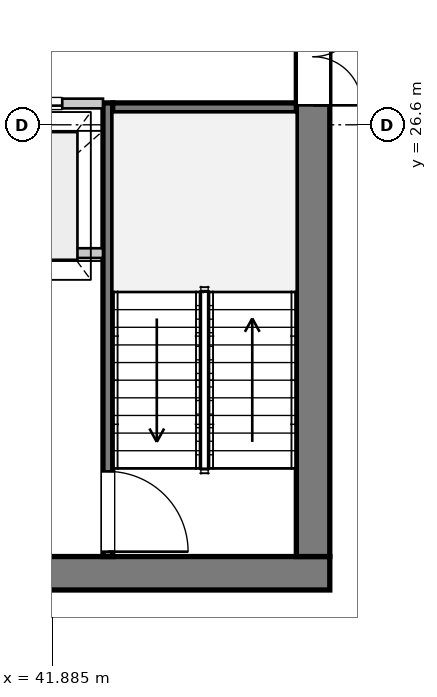
"""IFC4 building model, lengths in metres.
Left out: names, types, materials, properties, quantities, classifications, styles, units other than length and angle.
Written with IfcOpenShell. Run it as: python <this file> out.ifc"""

import sys

from ifc_helpers import new_model, si_unit, direction, frame, frame_2d, origin, place, context, subcontext, project, spatial, rectangle, extrude, source, transform, mapped, element, fill, save


model = new_model("IFC4")
c1 = context("Model", 3, precision=1e-05, world=origin(), true_north=direction((0.0, 1.0)))
c2 = subcontext(c1, "Body", "Model", "MODEL_VIEW")
j1 = project(units=[si_unit("LENGTHUNIT", "METRE"), si_unit("PLANEANGLEUNIT", "RADIAN")], contexts=[c1])
p1 = place(None, origin())
s1 = spatial("IfcSite", under=j1, at=p1, CompositionType="ELEMENT")
p2 = place(p1, origin())
s2 = spatial("IfcBuilding", under=s1, at=p2, CompositionType="ELEMENT")
p3 = place(p2, frame((0.0, 0.0, 185.65)))
s3 = spatial("IfcBuildingStorey", under=s2, at=p3, CompositionType="ELEMENT", Elevation=185.65)
p4 = place(p3, frame((53.034, 21.565, 0.0), z_axis=(0.0, 0.0, 1.0), x_axis=(-0.58764790483, -0.809116765337, 0.0)))
e1 = element("IfcWall", 1, at=p4, inside=s3, PredefinedType="SOLIDWALL", context=c2, shape_type="SweptSolid", body=[
    extrude(rectangle(XDim=23.285, YDim=0.32, at=frame_2d((11.643, 0.0))), origin(), (0.0, 0.0, 1.0), 2.722),
])
p5 = place(p4, frame((7.451, 0.0, 0.0)))
e2 = element("IfcOpeningElement", 2, at=p5, cuts=e1, PredefinedType="OPENING", context=c2, shape_type="SweptSolid", body=[
    extrude(rectangle(XDim=1.5, YDim=2.3, at=frame_2d((0.75, 1.15))), frame((0.0, 0.17, 0.0), z_axis=(0.0, -1.0, 0.0), x_axis=(1.0, 0.0, 0.0)), (0.0, 0.0, 1.0), 0.34),
])
p6 = place(p4, frame((14.331, 0.0, 0.252)))
e3 = element("IfcOpeningElement", 3, at=p6, cuts=e1, PredefinedType="OPENING", context=c2, shape_type="SweptSolid", body=[
    extrude(rectangle(XDim=2.6, YDim=2.35, at=frame_2d((1.3, 1.175))), frame((0.0, 0.17, 0.0), z_axis=(0.0, -1.0, 0.0), x_axis=(1.0, 0.0, 0.0)), (0.0, 0.0, 1.0), 0.34),
])
p7 = place(p3, frame((46.45, 19.225, 0.0), z_axis=(0.0, 0.0, 1.0), x_axis=(-1.0, 0.0, 0.0)))
e4 = element("IfcWall", 4, at=p7, inside=s3, PredefinedType="SHEAR", context=c2, shape_type="SweptSolid", body=[
    extrude(rectangle(XDim=16.9, YDim=0.55, at=frame_2d((8.45, 0.0))), origin(), (0.0, 0.0, 1.0), 3.33),
])
p8 = place(p7, frame((4.65, 0.0, 0.0)))
e5 = element("IfcOpeningElement", 5, at=p8, cuts=e4, PredefinedType="OPENING", context=c2, shape_type="SweptSolid", body=[
    extrude(rectangle(XDim=1.12, YDim=2.25, at=frame_2d((0.56, 1.125))), frame((0.0, 0.285, 0.0), z_axis=(0.0, -1.0, 0.0), x_axis=(1.0, 0.0, 0.0)), (0.0, 0.0, 1.0), 0.57),
])
p9 = place(p7, frame((11.15, 0.0, 0.0)))
e6 = element("IfcOpeningElement", 6, at=p9, cuts=e4, PredefinedType="OPENING", context=c2, shape_type="SweptSolid", body=[
    extrude(rectangle(XDim=1.12, YDim=2.25, at=frame_2d((0.56, 1.125))), frame((0.0, 0.285, 0.0), z_axis=(0.0, -1.0, 0.0), x_axis=(1.0, 0.0, 0.0)), (0.0, 0.0, 1.0), 0.57),
])
p10 = place(p3, frame((46.175, 33.7, 0.0), z_axis=(0.0, 0.0, 1.0), x_axis=(0.0, -1.0, 0.0)))
e7 = element("IfcWall", 7, at=p10, inside=s3, PredefinedType="SHEAR", context=c2, shape_type="SweptSolid", body=[
    extrude(rectangle(XDim=14.2, YDim=0.55, at=frame_2d((7.1, 0.0))), origin(), (0.0, 0.0, 1.0), 3.33),
])
p11 = place(p10, frame((5.18, 0.0, 0.0)))
e8 = element("IfcOpeningElement", 8, at=p11, cuts=e7, PredefinedType="OPENING", context=c2, shape_type="SweptSolid", body=[
    extrude(rectangle(XDim=1.6, YDim=2.2, at=frame_2d((0.8, 1.1))), frame((0.0, 0.285, 0.0), z_axis=(0.0, -1.0, 0.0), x_axis=(1.0, 0.0, 0.0)), (0.0, 0.0, 1.0), 0.57),
])
p12 = place(p10, frame((2.05, 0.0, 0.0)))
e9 = element("IfcOpeningElement", 9, at=p12, cuts=e7, PredefinedType="OPENING", context=c2, shape_type="SweptSolid", body=[
    extrude(rectangle(XDim=0.95, YDim=2.1, at=frame_2d((0.475, 1.05))), frame((0.0, 0.285, 0.0), z_axis=(0.0, -1.0, 0.0), x_axis=(1.0, 0.0, 0.0)), (0.0, 0.0, 1.0), 0.57),
])
p13 = place(p3, frame((42.8, 26.96, 0.0), z_axis=(0.0, 0.0, 1.0), x_axis=(0.0, -1.0, 0.0)))
e10 = element("IfcWall", 10, at=p13, inside=s3, PredefinedType="PARTITIONING", context=c2, shape_type="SweptSolid", body=[
    extrude(rectangle(XDim=7.46, YDim=0.16, at=frame_2d((3.73, 0.0))), origin(), (0.0, 0.0, 1.0), 3.33),
])
p14 = place(p13, frame((6.06, 0.0, 0.0)))
e11 = element("IfcOpeningElement", 11, at=p14, cuts=e10, PredefinedType="OPENING", context=c2, shape_type="SweptSolid", body=[
    extrude(rectangle(XDim=1.32, YDim=2.2, at=frame_2d((0.66, 1.1))), frame((0.0, 0.09, 0.0), z_axis=(0.0, -1.0, 0.0), x_axis=(1.0, 0.0, 0.0)), (0.0, 0.0, 1.0), 0.18),
])
p15 = place(p3, frame((42.88, 26.88, 0.0), z_axis=(0.0, 0.0, 1.0), x_axis=(1.0, 0.0, 0.0)))
e12 = element("IfcWall", 12, at=p15, inside=s3, PredefinedType="PARTITIONING", context=c2, shape_type="SweptSolid", body=[
    extrude(rectangle(XDim=3.02, YDim=0.16, at=frame_2d((1.51, 0.0))), origin(), (0.0, 0.0, 1.0), 3.33),
])
p16 = place(p3, frame((33.28, 24.49, 0.0), z_axis=(0.0, 0.0, 1.0), x_axis=(1.0, 0.0, 0.0)))
e13 = element("IfcWall", 13, at=p16, inside=s3, PredefinedType="PARTITIONING", context=c2, shape_type="SweptSolid", body=[
    extrude(rectangle(XDim=9.44, YDim=0.16, at=frame_2d((4.72, 0.0))), origin(), (0.0, 0.0, 1.0), 3.33),
])
p17 = place(p3, frame((33.28, 26.95, 0.0), z_axis=(0.0, 0.0, 1.0), x_axis=(1.0, 0.0, 0.0)))
e14 = element("IfcWall", 14, at=p17, inside=s3, PredefinedType="PARTITIONING", context=c2, shape_type="SweptSolid", body=[
    extrude(rectangle(XDim=9.44, YDim=0.16, at=frame_2d((4.72, 0.0))), origin(), (0.0, 0.0, 1.0), 3.33),
])
p18 = place(p17, frame((1.2, 0.0, 0.0)))
e15 = element("IfcOpeningElement", 15, at=p18, cuts=e14, PredefinedType="OPENING", context=c2, shape_type="SweptSolid", body=[
    extrude(rectangle(XDim=0.95, YDim=2.1, at=frame_2d((0.475, 1.05))), frame((0.0, 0.09, 0.0), z_axis=(0.0, -1.0, 0.0), x_axis=(1.0, 0.0, 0.0)), (0.0, 0.0, 1.0), 0.18),
])
p19 = place(p17, frame((4.65, 0.0, 0.0)))
e16 = element("IfcOpeningElement", 16, at=p19, cuts=e14, PredefinedType="OPENING", context=c2, shape_type="SweptSolid", body=[
    extrude(rectangle(XDim=0.95, YDim=2.1, at=frame_2d((0.475, 1.05))), frame((0.0, 0.09, 0.0), z_axis=(0.0, -1.0, 0.0), x_axis=(1.0, 0.0, 0.0)), (0.0, 0.0, 1.0), 0.18),
])
p20 = place(p17, frame((7.67, 0.0, 0.0)))
e17 = element("IfcOpeningElement", 17, at=p20, cuts=e14, PredefinedType="OPENING", context=c2, shape_type="SweptSolid", body=[
    extrude(rectangle(XDim=1.1, YDim=2.2, at=frame_2d((0.55, 1.1))), frame((0.0, 0.09, 0.0), z_axis=(0.0, -1.0, 0.0), x_axis=(1.0, 0.0, 0.0)), (0.0, 0.0, 1.0), 0.18),
])
m1 = source(origin(), c2, "Body", "SweptSolid", [
    extrude(rectangle(XDim=1.6, YDim=2.2, at=frame_2d((0.8, 1.1))), frame((0.0, 0.025, 0.0), z_axis=(0.0, -1.0, 0.0), x_axis=(1.0, 0.0, 0.0)), (0.0, 0.0, 1.0), 0.05),
])
p21 = place(p11, origin())
e18 = element("IfcDoor", 18, at=p21, inside=s3, OperationType="DOUBLE_DOOR_SINGLE_SWING", PredefinedType="DOOR", context=c2, shape_type="MappedRepresentation", body=[
    mapped(m1, transform((0.0, 0.0, 0.0), x_axis=(1.0, 0.0, 0.0), y_axis=(0.0, 1.0, 0.0), z_axis=(0.0, 0.0, 1.0), scale=1.0)),
])
fill(e8, e18)
m2 = source(origin(), c2, "Body", "SweptSolid", [
    extrude(rectangle(XDim=1.32, YDim=2.2, at=frame_2d((0.66, 1.1))), frame((0.0, 0.025, 0.0), z_axis=(0.0, -1.0, 0.0), x_axis=(1.0, 0.0, 0.0)), (0.0, 0.0, 1.0), 0.05),
])
p22 = place(p14, origin())
e19 = element("IfcDoor", 19, at=p22, inside=s3, OperationType="SINGLE_SWING_RIGHT", PredefinedType="DOOR", context=c2, shape_type="MappedRepresentation", body=[
    mapped(m2, transform((0.0, 0.0, 0.0), x_axis=(1.0, 0.0, 0.0), y_axis=(0.0, 1.0, 0.0), z_axis=(0.0, 0.0, 1.0), scale=1.0)),
])
fill(e11, e19)
m3 = source(origin(), c2, "Body", "SweptSolid", [
    extrude(rectangle(XDim=1.1, YDim=2.2, at=frame_2d((0.55, 1.1))), frame((0.0, 0.025, 0.0), z_axis=(0.0, -1.0, 0.0), x_axis=(1.0, 0.0, 0.0)), (0.0, 0.0, 1.0), 0.05),
])
p23 = place(p20, origin())
e20 = element("IfcDoor", 20, at=p23, inside=s3, OperationType="DOUBLE_DOOR_SLIDING", PredefinedType="DOOR", context=c2, shape_type="MappedRepresentation", body=[
    mapped(m3, transform((0.0, 0.0, 0.0), x_axis=(1.0, 0.0, 0.0), y_axis=(0.0, 1.0, 0.0), z_axis=(0.0, 0.0, 1.0), scale=1.0)),
])
fill(e17, e20)
save(model, sys.argv[1])
